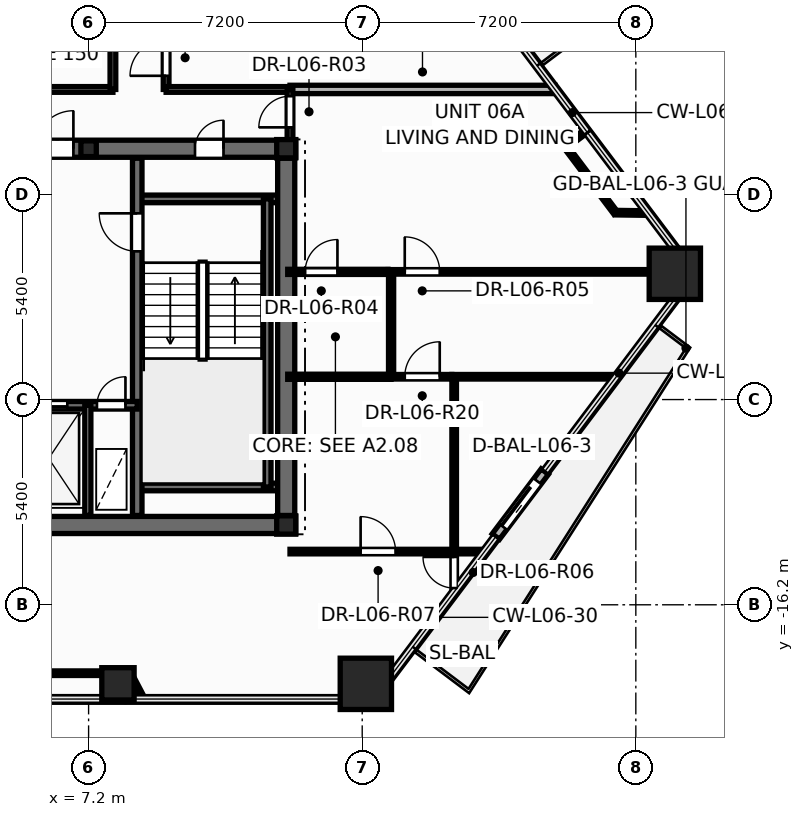
"""IFC4 building model, lengths in metres.
Left out: names, types, materials, properties, quantities, classifications, styles, units other than length and angle.
Written with IfcOpenShell. Run it as: python <this file> out.ifc"""

import sys

from ifc_helpers import new_model, si_unit, direction, frame, frame_2d, origin, origin_2d, place, context, subcontext, project, spatial, rectangle, hollow_rectangle, hollow_circle, i_section, extrude, element, fill, save


model = new_model("IFC4")
c1 = context("Model", 3, precision=1e-05, world=origin(), true_north=direction((0.0, 1.0)))
c2 = subcontext(c1, "Body", "Model", "MODEL_VIEW")
j1 = project(units=[si_unit("LENGTHUNIT", "METRE"), si_unit("PLANEANGLEUNIT", "RADIAN")], contexts=[c1])
p1 = place(None, origin())
s1 = spatial("IfcSite", under=j1, at=p1, CompositionType="ELEMENT")
p2 = place(p1, origin())
s2 = spatial("IfcBuilding", under=s1, at=p2, CompositionType="ELEMENT")
p3 = place(p2, frame((0.0, 0.0, 27.9)))
s3 = spatial("IfcBuildingStorey", under=s2, at=p3, CompositionType="ELEMENT", Elevation=27.9)
for number, where, z_axis, x_axis in (
    (1, (14.496, -18.28, 0.0), (0.0, 0.0, 1.0), (1.0, 0.0, 0.0)),
    (2, (22.626, -7.49, 0.0), (0.0, 0.0, 1.0), (1.0, 0.0, 0.0)),
):
    element("IfcColumn", number, at=place(p3, frame(where, z_axis=z_axis, x_axis=x_axis)), inside=s3, PredefinedType="COLUMN", context=c2, shape_type="SweptSolid", body=[
        extrude(hollow_rectangle(XDim=1.35, YDim=1.35, WallThickness=0.065, at=origin_2d()), origin(), (0.0, 0.0, 1.0), 3.6),
    ])
p4 = place(p3, frame((7.973, -18.28, 0.0), z_axis=(0.0, 0.0, 1.0), x_axis=(1.0, 0.0, 0.0)))
e3 = element("IfcColumn", 3, at=p4, inside=s3, PredefinedType="COLUMN", context=c2, shape_type="SweptSolid", body=[
    extrude(hollow_circle(Radius=0.425, WallThickness=0.038, at=origin_2d()), origin(), (0.0, 0.0, 1.0), 3.6),
])
for number, where, z_axis, x_axis in (
    (4, (12.4, -14.1, 0.0), (0.0, 0.0, 1.0), (1.0, 0.0, 0.0)),
    (5, (12.4, -4.2, 0.0), (0.0, 0.0, 1.0), (1.0, 0.0, 0.0)),
):
    element("IfcColumn", number, at=place(p3, frame(where, z_axis=z_axis, x_axis=x_axis)), inside=s3, PredefinedType="COLUMN", context=c2, shape_type="SweptSolid", body=[
        extrude(i_section(OverallWidth=0.5, OverallDepth=0.482, WebThickness=0.04, FlangeThickness=0.045, at=origin_2d()), origin(), (0.0, 0.0, 1.0), 3.6),
    ])
p5 = place(p3, frame((7.2, -4.2, 0.0), z_axis=(0.0, 0.0, 1.0), x_axis=(1.0, 0.0, 0.0)))
e6 = element("IfcColumn", 6, at=p5, inside=s3, PredefinedType="PILASTER", context=c2, shape_type="SweptSolid", body=[
    extrude(i_section(OverallWidth=0.405, OverallDepth=0.414, WebThickness=0.022, FlangeThickness=0.032, at=origin_2d()), origin(), (0.0, 0.0, 1.0), 3.6),
])
p6 = place(p3, frame((17.917, -14.405, -0.015), z_axis=(0.0, 0.0, 1.0), x_axis=(0.601896635284, 0.798574004357, 0.0)))
e7 = element("IfcWall", 7, at=p6, inside=s3, PredefinedType="STANDARD", context=c2, shape_type="SweptSolid", body=[
    extrude(rectangle(XDim=2.14, YDim=0.24, at=frame_2d((1.07, 0.0))), origin(), (0.0, 0.0, 1.0), 2.728),
])
p7 = place(p6, frame((0.32, 0.0, 0.015)))
e8 = element("IfcOpeningElement", 8, at=p7, cuts=e7, PredefinedType="OPENING", context=c2, shape_type="SweptSolid", body=[
    extrude(rectangle(XDim=1.506, YDim=2.204, at=frame_2d((0.75, 1.102))), frame((0.0, 0.13, 0.0), z_axis=(0.0, -1.0, 0.0), x_axis=(1.0, 0.0, 0.0)), (0.0, 0.0, 1.0), 0.26),
])
p8 = place(p3, frame((-12.65, -14.1, 0.0), z_axis=(0.0, 0.0, 1.0), x_axis=(1.0, 0.0, 0.0)))
e9 = element("IfcWall", 9, at=p8, inside=s3, PredefinedType="SHEAR", context=c2, shape_type="SweptSolid", body=[
    extrude(rectangle(XDim=25.3, YDim=0.45, at=frame_2d((12.65, 0.0))), origin(), (0.0, 0.0, 1.0), 3.6),
])
p9 = place(p3, frame((-12.65, -4.2, 0.0), z_axis=(0.0, 0.0, 1.0), x_axis=(1.0, 0.0, 0.0)))
e10 = element("IfcWall", 10, at=p9, inside=s3, PredefinedType="SHEAR", context=c2, shape_type="SweptSolid", body=[
    extrude(rectangle(XDim=25.3, YDim=0.45, at=frame_2d((12.65, 0.0))), origin(), (0.0, 0.0, 1.0), 3.6),
])
p10 = place(p9, frame((1.85, 0.0, 0.0)))
e11 = element("IfcOpeningElement", 11, at=p10, cuts=e10, PredefinedType="OPENING", context=c2, shape_type="SweptSolid", body=[
    extrude(rectangle(XDim=0.756, YDim=2.054, at=frame_2d((0.375, 1.027))), frame((0.0, 0.235, 0.0), z_axis=(0.0, -1.0, 0.0), x_axis=(1.0, 0.0, 0.0)), (0.0, 0.0, 1.0), 0.47),
])
p11 = place(p9, frame((22.65, 0.0, 0.0)))
e12 = element("IfcOpeningElement", 12, at=p11, cuts=e10, PredefinedType="OPENING", context=c2, shape_type="SweptSolid", body=[
    extrude(rectangle(XDim=0.756, YDim=2.054, at=frame_2d((0.375, 1.027))), frame((0.0, 0.235, 0.0), z_axis=(0.0, -1.0, 0.0), x_axis=(1.0, 0.0, 0.0)), (0.0, 0.0, 1.0), 0.47),
])
p12 = place(p9, frame((5.85, 0.0, 0.0)))
e13 = element("IfcOpeningElement", 13, at=p12, cuts=e10, PredefinedType="OPENING", context=c2, shape_type="SweptSolid", body=[
    extrude(rectangle(XDim=1.006, YDim=2.104, at=frame_2d((0.5, 1.052))), frame((0.0, 0.235, 0.0), z_axis=(0.0, -1.0, 0.0), x_axis=(1.0, 0.0, 0.0)), (0.0, 0.0, 1.0), 0.47),
])
p13 = place(p9, frame((10.35, 0.0, 0.0)))
e14 = element("IfcOpeningElement", 14, at=p13, cuts=e10, PredefinedType="OPENING", context=c2, shape_type="SweptSolid", body=[
    extrude(rectangle(XDim=1.406, YDim=2.154, at=frame_2d((0.7, 1.077))), frame((0.0, 0.235, 0.0), z_axis=(0.0, -1.0, 0.0), x_axis=(1.0, 0.0, 0.0)), (0.0, 0.0, 1.0), 0.47),
])
p14 = place(p9, frame((18.45, 0.0, 0.0)))
e15 = element("IfcOpeningElement", 15, at=p14, cuts=e10, PredefinedType="OPENING", context=c2, shape_type="SweptSolid", body=[
    extrude(rectangle(XDim=1.006, YDim=2.104, at=frame_2d((0.5, 1.052))), frame((0.0, 0.235, 0.0), z_axis=(0.0, -1.0, 0.0), x_axis=(1.0, 0.0, 0.0)), (0.0, 0.0, 1.0), 0.47),
])
for number, where, z_axis, x_axis in (
    (16, (8.48, -5.52, 0.0), (0.0, 0.0, 1.0), (1.0, 0.0, 0.0)),
    (17, (8.48, -13.1, 0.0), (0.0, 0.0, 1.0), (1.0, 0.0, 0.0)),
):
    element("IfcWall", number, at=place(p3, frame(where, z_axis=z_axis, x_axis=x_axis)), inside=s3, PredefinedType="SOLIDWALL", context=c2, shape_type="SweptSolid", body=[
        extrude(rectangle(XDim=3.87, YDim=0.2, at=frame_2d((1.935, 0.0))), origin(), (0.0, 0.0, 1.0), 3.6),
    ])
p15 = place(p3, frame((11.9, -13.1, 0.0), z_axis=(0.0, 0.0, 1.0), x_axis=(0.0, 1.0, 0.0)))
e18 = element("IfcWall", 18, at=p15, inside=s3, PredefinedType="SOLIDWALL", context=c2, shape_type="SweptSolid", body=[
    extrude(rectangle(XDim=7.58, YDim=0.2, at=frame_2d((3.79, 0.0))), origin(), (0.0, 0.0, 1.0), 3.6),
])
p16 = place(p3, frame((8.48, -13.85, 0.0), z_axis=(0.0, 0.0, 1.0), x_axis=(0.0, 1.0, 0.0)))
e19 = element("IfcWall", 19, at=p16, inside=s3, PredefinedType="SHEAR", context=c2, shape_type="SweptSolid", body=[
    extrude(rectangle(XDim=9.4, YDim=0.25, at=frame_2d((4.7, 0.0))), origin(), (0.0, 0.0, 1.0), 3.6),
])
p17 = place(p16, frame((6.95, 0.0, 0.0)))
e20 = element("IfcOpeningElement", 20, at=p17, cuts=e19, PredefinedType="OPENING", context=c2, shape_type="SweptSolid", body=[
    extrude(rectangle(XDim=1.006, YDim=2.104, at=frame_2d((0.5, 1.052))), frame((0.0, 0.135, 0.0), z_axis=(0.0, -1.0, 0.0), x_axis=(1.0, 0.0, 0.0)), (0.0, 0.0, 1.0), 0.27),
])
p18 = place(p3, frame((5.12, -10.95, 0.0), z_axis=(0.0, 0.0, 1.0), x_axis=(1.0, 0.0, 0.0)))
e21 = element("IfcWall", 21, at=p18, inside=s3, PredefinedType="SOLIDWALL", context=c2, shape_type="SweptSolid", body=[
    extrude(rectangle(XDim=3.36, YDim=0.2, at=frame_2d((1.68, 0.0))), origin(), (0.0, 0.0, 1.0), 3.6),
])
p19 = place(p18, frame((0.42, 0.0, 0.0)))
e22 = element("IfcOpeningElement", 22, at=p19, cuts=e21, PredefinedType="OPENING", context=c2, shape_type="SweptSolid", body=[
    extrude(rectangle(XDim=1.106, YDim=2.104, at=frame_2d((0.55, 1.052))), frame((0.0, 0.11, 0.0), z_axis=(0.0, -1.0, 0.0), x_axis=(1.0, 0.0, 0.0)), (0.0, 0.0, 1.0), 0.22),
])
p20 = place(p18, frame((2.3, 0.0, 0.0)))
e23 = element("IfcOpeningElement", 23, at=p20, cuts=e21, PredefinedType="OPENING", context=c2, shape_type="SweptSolid", body=[
    extrude(rectangle(XDim=0.756, YDim=2.054, at=frame_2d((0.375, 1.027))), frame((0.0, 0.11, 0.0), z_axis=(0.0, -1.0, 0.0), x_axis=(1.0, 0.0, 0.0)), (0.0, 0.0, 1.0), 0.22),
])
p21 = place(p3, frame((7.18, -13.85, 0.0), z_axis=(0.0, 0.0, 1.0), x_axis=(0.0, 1.0, 0.0)))
e24 = element("IfcWall", 24, at=p21, inside=s3, PredefinedType="PARTITIONING", context=c2, shape_type="SweptSolid", body=[
    extrude(rectangle(XDim=2.9, YDim=0.16, at=frame_2d((1.45, 0.0))), origin(), (0.0, 0.0, 1.0), 2.375),
])
p22 = place(p3, frame((12.4, -13.85, 0.0), z_axis=(0.0, 0.0, 1.0), x_axis=(0.0, 1.0, 0.0)))
e25 = element("IfcWall", 25, at=p22, inside=s3, PredefinedType="SHEAR", context=c2, shape_type="SweptSolid", body=[
    extrude(rectangle(XDim=9.4, YDim=0.45, at=frame_2d((4.7, 0.0))), origin(), (0.0, 0.0, 1.0), 3.6),
])
p23 = place(p3, frame((-5.32, -2.64, 0.0), z_axis=(0.0, 0.0, 1.0), x_axis=(1.0, 0.0, 0.0)))
e26 = element("IfcWall", 26, at=p23, inside=s3, PredefinedType="PARTITIONING", context=c2, shape_type="SweptSolid", body=[
    extrude(rectangle(XDim=13.16, YDim=0.15, at=frame_2d((6.58, 0.0))), origin(), (0.0, 0.0, 1.0), 2.325),
])
p24 = place(p23, frame((0.439, 0.0, 0.0)))
e27 = element("IfcOpeningElement", 27, at=p24, cuts=e26, PredefinedType="OPENING", context=c2, shape_type="SweptSolid", body=[
    extrude(rectangle(XDim=0.956, YDim=2.104, at=frame_2d((0.475, 1.052))), frame((0.0, 0.085, 0.0), z_axis=(0.0, -1.0, 0.0), x_axis=(1.0, 0.0, 0.0)), (0.0, 0.0, 1.0), 0.17),
])
p25 = place(p3, frame((9.24, -2.64, 0.0), z_axis=(0.0, 0.0, 1.0), x_axis=(0.0, 1.0, 0.0)))
e28 = element("IfcWall", 28, at=p25, inside=s3, PredefinedType="PARTITIONING", context=c2, shape_type="SweptSolid", body=[
    extrude(rectangle(XDim=8.84, YDim=0.15, at=frame_2d((4.42, 0.0))), origin(), (0.0, 0.0, 1.0), 2.509),
])
p26 = place(p25, frame((0.359, 0.0, 0.0)))
e29 = element("IfcOpeningElement", 29, at=p26, cuts=e28, PredefinedType="OPENING", context=c2, shape_type="SweptSolid", body=[
    extrude(rectangle(XDim=0.956, YDim=2.104, at=frame_2d((0.475, 1.052))), frame((0.0, 0.085, 0.0), z_axis=(0.0, -1.0, 0.0), x_axis=(1.0, 0.0, 0.0)), (0.0, 0.0, 1.0), 0.17),
])
p27 = place(p3, frame((15.08, -7.44, 0.0), z_axis=(0.0, 0.0, 1.0), x_axis=(1.0, 0.0, 0.0)))
e30 = element("IfcWall", 30, at=p27, inside=s3, PredefinedType="PARTITIONING", context=c2, shape_type="SweptSolid", body=[
    extrude(rectangle(XDim=8.009, YDim=0.12, at=frame_2d((4.005, 0.0))), origin(), (0.0, 0.0, 1.0), 2.325),
])
p28 = place(p27, frame((0.439, 0.0, 0.0)))
e31 = element("IfcOpeningElement", 31, at=p28, cuts=e30, PredefinedType="OPENING", context=c2, shape_type="SweptSolid", body=[
    extrude(rectangle(XDim=0.926, YDim=2.104, at=frame_2d((0.46, 1.052))), frame((0.0, 0.07, 0.0), z_axis=(0.0, -1.0, 0.0), x_axis=(1.0, 0.0, 0.0)), (0.0, 0.0, 1.0), 0.14),
])
p29 = place(p3, frame((12.5, -2.64, 0.0), z_axis=(0.0, 0.0, 1.0), x_axis=(1.0, 0.0, 0.0)))
e32 = element("IfcWall", 32, at=p29, inside=s3, PredefinedType="PARTITIONING", context=c2, shape_type="SweptSolid", body=[
    extrude(rectangle(XDim=6.972, YDim=0.22, at=frame_2d((3.486, 0.0))), origin(), (0.0, 0.0, 1.0), 2.713),
])
p30 = place(p3, frame((16.82, -15.861, 0.0), z_axis=(0.0, 0.0, 1.0), x_axis=(0.0, 1.0, 0.0)))
e33 = element("IfcWall", 33, at=p30, inside=s3, PredefinedType="PARTITIONING", context=c2, shape_type="SweptSolid", body=[
    extrude(rectangle(XDim=5.661, YDim=0.12, at=frame_2d((2.83, 0.0))), origin(), (0.0, 0.0, 1.0), 2.713),
])
p31 = place(p30, frame((0.1, 0.0, 0.0)))
e34 = element("IfcOpeningElement", 34, at=p31, cuts=e33, PredefinedType="OPENING", context=c2, shape_type="SweptSolid", body=[
    extrude(rectangle(XDim=0.826, YDim=2.104, at=frame_2d((0.41, 1.052))), frame((0.0, 0.07, 0.0), z_axis=(0.0, -1.0, 0.0), x_axis=(1.0, 0.0, 0.0)), (0.0, 0.0, 1.0), 0.14),
])
p32 = place(p3, frame((12.5, -14.8, 0.0), z_axis=(0.0, 0.0, 1.0), x_axis=(1.0, 0.0, 0.0)))
e35 = element("IfcWall", 35, at=p32, inside=s3, PredefinedType="PARTITIONING", context=c2, shape_type="SweptSolid", body=[
    extrude(rectangle(XDim=5.119, YDim=0.12, at=frame_2d((2.56, 0.0))), origin(), (0.0, 0.0, 1.0), 2.713),
])
p33 = place(p32, frame((1.858, 0.0, 0.0)))
e36 = element("IfcOpeningElement", 36, at=p33, cuts=e35, PredefinedType="OPENING", context=c2, shape_type="SweptSolid", body=[
    extrude(rectangle(XDim=0.926, YDim=2.104, at=frame_2d((0.46, 1.052))), frame((0.0, 0.07, 0.0), z_axis=(0.0, -1.0, 0.0), x_axis=(1.0, 0.0, 0.0)), (0.0, 0.0, 1.0), 0.14),
])
p34 = place(p3, frame((16.76, -10.2, 0.0), z_axis=(0.0, 0.0, 1.0), x_axis=(1.0, 0.0, 0.0)))
e37 = element("IfcWall", 37, at=p34, inside=s3, PredefinedType="PARTITIONING", context=c2, shape_type="SweptSolid", body=[
    extrude(rectangle(XDim=4.325, YDim=0.12, at=frame_2d((2.163, 0.0))), origin(), (0.0, 0.0, 1.0), 2.713),
])
p35 = place(p3, frame((7.84, -2.64, 0.0), z_axis=(0.0, 0.0, 1.0), x_axis=(0.0, 1.0, 0.0)))
e38 = element("IfcWall", 38, at=p35, inside=s3, PredefinedType="PARTITIONING", context=c2, shape_type="SweptSolid", body=[
    extrude(rectangle(XDim=6.5, YDim=0.15, at=frame_2d((3.25, 0.0))), origin(), (0.0, 0.0, 1.0), 2.509),
])
p36 = place(p3, frame((4.937, -18.0, 0.0), z_axis=(0.0, 0.0, 1.0), x_axis=(1.0, 0.0, 0.0)))
e39 = element("IfcWall", 39, at=p36, inside=s3, PredefinedType="PARTITIONING", context=c2, shape_type="SweptSolid", body=[
    extrude(rectangle(XDim=3.334, YDim=0.12, at=frame_2d((1.667, 0.0))), origin(), (0.0, 0.0, 1.0), 2.713),
])
p37 = place(p3, frame((9.24, -2.64, 0.0), z_axis=(0.0, 0.0, 1.0), x_axis=(1.0, 0.0, 0.0)))
e40 = element("IfcWall", 40, at=p37, inside=s3, PredefinedType="PARTITIONING", context=c2, shape_type="SweptSolid", body=[
    extrude(rectangle(XDim=3.26, YDim=0.15, at=frame_2d((1.63, 0.0))), origin(), (0.0, 0.0, 1.0), 3.35),
])
p38 = place(p3, frame((12.44, -7.44, 0.0), z_axis=(0.0, 0.0, 1.0), x_axis=(1.0, 0.0, 0.0)))
e41 = element("IfcWall", 41, at=p38, inside=s3, PredefinedType="PARTITIONING", context=c2, shape_type="SweptSolid", body=[
    extrude(rectangle(XDim=2.638, YDim=0.135, at=frame_2d((1.319, 0.0))), origin(), (0.0, 0.0, 1.0), 2.713),
])
p39 = place(p38, frame((0.458, 0.0, 0.0)))
e42 = element("IfcOpeningElement", 42, at=p39, cuts=e41, PredefinedType="OPENING", context=c2, shape_type="SweptSolid", body=[
    extrude(rectangle(XDim=0.856, YDim=2.104, at=frame_2d((0.425, 1.052))), frame((0.0, 0.078, 0.0), z_axis=(0.0, -1.0, 0.0), x_axis=(1.0, 0.0, 0.0)), (0.0, 0.0, 1.0), 0.155),
])
p40 = place(p3, frame((15.16, -10.2, 0.0), z_axis=(0.0, 0.0, 1.0), x_axis=(0.0, 1.0, 0.0)))
e43 = element("IfcWall", 43, at=p40, inside=s3, PredefinedType="PARTITIONING", context=c2, shape_type="SweptSolid", body=[
    extrude(rectangle(XDim=2.76, YDim=0.135, at=frame_2d((1.38, 0.0))), origin(), (0.0, 0.0, 1.0), 3.35),
])
p41 = place(p3, frame((12.44, -10.2, 0.0), z_axis=(0.0, 0.0, 1.0), x_axis=(1.0, 0.0, 0.0)))
e44 = element("IfcWall", 44, at=p41, inside=s3, PredefinedType="PARTITIONING", context=c2, shape_type="SweptSolid", body=[
    extrude(rectangle(XDim=2.72, YDim=0.135, at=frame_2d((1.36, 0.0))), origin(), (0.0, 0.0, 1.0), 2.713),
])
p42 = place(p3, frame((21.063, -5.881, 0.0), z_axis=(0.0, 0.0, 1.0), x_axis=(-0.601772594651, 0.798667480449, 0.0)))
e45 = element("IfcWall", 45, at=p42, inside=s3, PredefinedType="PARTITIONING", context=c2, shape_type="SweptSolid", body=[
    extrude(rectangle(XDim=2.18, YDim=0.12, at=frame_2d((1.09, 0.0))), origin(), (0.0, 0.0, 1.0), 3.35),
])
p43 = place(p3, frame((15.16, -10.2, 0.0), z_axis=(0.0, 0.0, 1.0), x_axis=(1.0, 0.0, 0.0)))
e46 = element("IfcWall", 46, at=p43, inside=s3, PredefinedType="PARTITIONING", context=c2, shape_type="SweptSolid", body=[
    extrude(rectangle(XDim=1.598, YDim=0.12, at=frame_2d((0.799, 0.0))), origin(), (0.0, 0.0, 1.0), 3.35),
])
p44 = place(p43, frame((0.36, 0.0, 0.0)))
e47 = element("IfcOpeningElement", 47, at=p44, cuts=e46, PredefinedType="OPENING", context=c2, shape_type="SweptSolid", body=[
    extrude(rectangle(XDim=0.926, YDim=2.104, at=frame_2d((0.46, 1.052))), frame((0.0, 0.07, 0.0), z_axis=(0.0, -1.0, 0.0), x_axis=(1.0, 0.0, 0.0)), (0.0, 0.0, 1.0), 0.14),
])
p45 = place(p3, frame((12.5, -4.24, 0.0), z_axis=(0.0, 0.0, 1.0), x_axis=(0.0, 1.0, 0.0)))
e48 = element("IfcWall", 48, at=p45, inside=s3, PredefinedType="PARTITIONING", context=c2, shape_type="SweptSolid", body=[
    extrude(rectangle(XDim=1.6, YDim=0.15, at=frame_2d((0.8, 0.0))), origin(), (0.0, 0.0, 1.0), 2.325),
])
p46 = place(p45, frame((0.602, 0.0, 0.0)))
e49 = element("IfcOpeningElement", 49, at=p46, cuts=e48, PredefinedType="OPENING", context=c2, shape_type="SweptSolid", body=[
    extrude(rectangle(XDim=0.826, YDim=2.104, at=frame_2d((0.41, 1.052))), frame((0.0, 0.085, 0.0), z_axis=(0.0, -1.0, 0.0), x_axis=(1.0, 0.0, 0.0)), (0.0, 0.0, 1.0), 0.17),
])
p47 = place(p3, frame((21.911, -5.893, 0.0), z_axis=(0.0, 0.0, 1.0), x_axis=(-0.999908336428, 0.013539525155, 0.0)))
e50 = element("IfcWall", 50, at=p47, inside=s3, PredefinedType="PARTITIONING", context=c2, shape_type="SweptSolid", body=[
    extrude(rectangle(XDim=0.847, YDim=0.12, at=frame_2d((0.424, 0.0))), origin(), (0.0, 0.0, 1.0), 2.713),
])
p48 = place(p3, frame((8.271, -18.0, 0.0), z_axis=(0.0, 0.0, 1.0), x_axis=(0.464175849306, -0.885743067103, 0.0)))
e51 = element("IfcWall", 51, at=p48, inside=s3, PredefinedType="PARTITIONING", context=c2, shape_type="SweptSolid", body=[
    extrude(rectangle(XDim=0.756, YDim=0.12, at=frame_2d((0.378, 0.0))), origin(), (0.0, 0.0, 1.0), 2.713),
])
p49 = place(p3, frame((19.752, -4.14, 0.0), z_axis=(0.0, 0.0, 1.0), x_axis=(0.798641978857, 0.601806438655, 0.0)))
e52 = element("IfcWall", 52, at=p49, inside=s3, PredefinedType="PARTITIONING", context=c2, shape_type="SweptSolid", body=[
    extrude(rectangle(XDim=0.67, YDim=0.12, at=frame_2d((0.335, 0.0))), origin(), (0.0, 0.0, 1.0), 2.713),
])
p50 = place(p7, origin())
e53 = element("IfcDoor", 53, at=p50, inside=s3, OperationType="SLIDING_TO_RIGHT", PredefinedType="DOOR", context=c2, shape_type="SweptSolid", body=[
    extrude(rectangle(XDim=1.5, YDim=2.2, at=frame_2d((0.75, 1.1))), frame((0.0, 0.025, 0.0), z_axis=(0.0, -1.0, 0.0), x_axis=(1.0, 0.0, 0.0)), (0.0, 0.0, 1.0), 0.05),
])
fill(e8, e53)
p51 = place(p17, origin())
e54 = element("IfcDoor", 54, at=p51, inside=s3, OperationType="SINGLE_SWING_RIGHT", PredefinedType="DOOR", context=c2, shape_type="SweptSolid", body=[
    extrude(rectangle(XDim=1.0, YDim=2.1, at=frame_2d((0.5, 1.05))), frame((0.0, 0.025, 0.0), z_axis=(0.0, -1.0, 0.0), x_axis=(1.0, 0.0, 0.0)), (0.0, 0.0, 1.0), 0.05),
])
fill(e20, e54)
p52 = place(p19, origin())
e55 = element("IfcDoor", 55, at=p52, inside=s3, OperationType="DOUBLE_DOOR_SLIDING", PredefinedType="DOOR", context=c2, shape_type="SweptSolid", body=[
    extrude(rectangle(XDim=1.1, YDim=2.1, at=frame_2d((0.55, 1.05))), frame((0.0, 0.025, 0.0), z_axis=(0.0, -1.0, 0.0), x_axis=(1.0, 0.0, 0.0)), (0.0, 0.0, 1.0), 0.05),
])
fill(e22, e55)
p53 = place(p20, origin())
e56 = element("IfcDoor", 56, at=p53, inside=s3, OperationType="SINGLE_SWING_RIGHT", PredefinedType="DOOR", context=c2, shape_type="SweptSolid", body=[
    extrude(rectangle(XDim=0.75, YDim=2.05, at=frame_2d((0.375, 1.025))), frame((0.0, 0.025, 0.0), z_axis=(0.0, -1.0, 0.0), x_axis=(1.0, 0.0, 0.0)), (0.0, 0.0, 1.0), 0.05),
])
fill(e23, e56)
p54 = place(p11, origin())
e57 = element("IfcDoor", 57, at=p54, inside=s3, OperationType="SINGLE_SWING_RIGHT", PredefinedType="DOOR", context=c2, shape_type="SweptSolid", body=[
    extrude(rectangle(XDim=0.75, YDim=2.05, at=frame_2d((0.375, 1.025))), frame((0.0, 0.025, 0.0), z_axis=(0.0, -1.0, 0.0), x_axis=(1.0, 0.0, 0.0)), (0.0, 0.0, 1.0), 0.05),
])
fill(e12, e57)
p55 = place(p14, origin())
e58 = element("IfcDoor", 58, at=p55, inside=s3, OperationType="SINGLE_SWING_RIGHT", PredefinedType="DOOR", context=c2, shape_type="SweptSolid", body=[
    extrude(rectangle(XDim=1.0, YDim=2.1, at=frame_2d((0.5, 1.05))), frame((0.0, 0.025, 0.0), z_axis=(0.0, -1.0, 0.0), x_axis=(1.0, 0.0, 0.0)), (0.0, 0.0, 1.0), 0.05),
])
fill(e15, e58)
p56 = place(p46, origin())
e59 = element("IfcDoor", 59, at=p56, inside=s3, OperationType="SINGLE_SWING_LEFT", PredefinedType="DOOR", context=c2, shape_type="SweptSolid", body=[
    extrude(rectangle(XDim=0.82, YDim=2.1, at=frame_2d((0.41, 1.05))), frame((0.0, 0.025, 0.0), z_axis=(0.0, -1.0, 0.0), x_axis=(1.0, 0.0, 0.0)), (0.0, 0.0, 1.0), 0.05),
])
fill(e49, e59)
p57 = place(p39, origin())
e60 = element("IfcDoor", 60, at=p57, inside=s3, OperationType="SINGLE_SWING_RIGHT", PredefinedType="DOOR", context=c2, shape_type="SweptSolid", body=[
    extrude(rectangle(XDim=0.85, YDim=2.1, at=frame_2d((0.425, 1.05))), frame((0.0, 0.025, 0.0), z_axis=(0.0, -1.0, 0.0), x_axis=(1.0, 0.0, 0.0)), (0.0, 0.0, 1.0), 0.05),
])
fill(e42, e60)
p58 = place(p28, origin())
e61 = element("IfcDoor", 61, at=p58, inside=s3, OperationType="SINGLE_SWING_LEFT", PredefinedType="DOOR", context=c2, shape_type="SweptSolid", body=[
    extrude(rectangle(XDim=0.92, YDim=2.1, at=frame_2d((0.46, 1.05))), frame((0.0, 0.025, 0.0), z_axis=(0.0, -1.0, 0.0), x_axis=(1.0, 0.0, 0.0)), (0.0, 0.0, 1.0), 0.05),
])
fill(e31, e61)
p59 = place(p31, origin())
e62 = element("IfcDoor", 62, at=p59, inside=s3, OperationType="SINGLE_SWING_RIGHT", PredefinedType="DOOR", context=c2, shape_type="SweptSolid", body=[
    extrude(rectangle(XDim=0.82, YDim=2.1, at=frame_2d((0.41, 1.05))), frame((0.0, 0.025, 0.0), z_axis=(0.0, -1.0, 0.0), x_axis=(1.0, 0.0, 0.0)), (0.0, 0.0, 1.0), 0.05),
])
fill(e34, e62)
p60 = place(p33, origin())
e63 = element("IfcDoor", 63, at=p60, inside=s3, OperationType="SINGLE_SWING_LEFT", PredefinedType="DOOR", context=c2, shape_type="SweptSolid", body=[
    extrude(rectangle(XDim=0.92, YDim=2.1, at=frame_2d((0.46, 1.05))), frame((0.0, 0.025, 0.0), z_axis=(0.0, -1.0, 0.0), x_axis=(1.0, 0.0, 0.0)), (0.0, 0.0, 1.0), 0.05),
])
fill(e36, e63)
p61 = place(p26, origin())
e64 = element("IfcDoor", 64, at=p61, inside=s3, OperationType="SINGLE_SWING_LEFT", PredefinedType="DOOR", context=c2, shape_type="SweptSolid", body=[
    extrude(rectangle(XDim=0.95, YDim=2.1, at=frame_2d((0.475, 1.05))), frame((0.0, 0.025, 0.0), z_axis=(0.0, -1.0, 0.0), x_axis=(1.0, 0.0, 0.0)), (0.0, 0.0, 1.0), 0.05),
])
fill(e29, e64)
p62 = place(p44, origin())
e65 = element("IfcDoor", 65, at=p62, inside=s3, OperationType="SINGLE_SWING_RIGHT", PredefinedType="DOOR", context=c2, shape_type="SweptSolid", body=[
    extrude(rectangle(XDim=0.92, YDim=2.1, at=frame_2d((0.46, 1.05))), frame((0.0, 0.025, 0.0), z_axis=(0.0, -1.0, 0.0), x_axis=(1.0, 0.0, 0.0)), (0.0, 0.0, 1.0), 0.05),
])
fill(e47, e65)
save(model, sys.argv[1])
